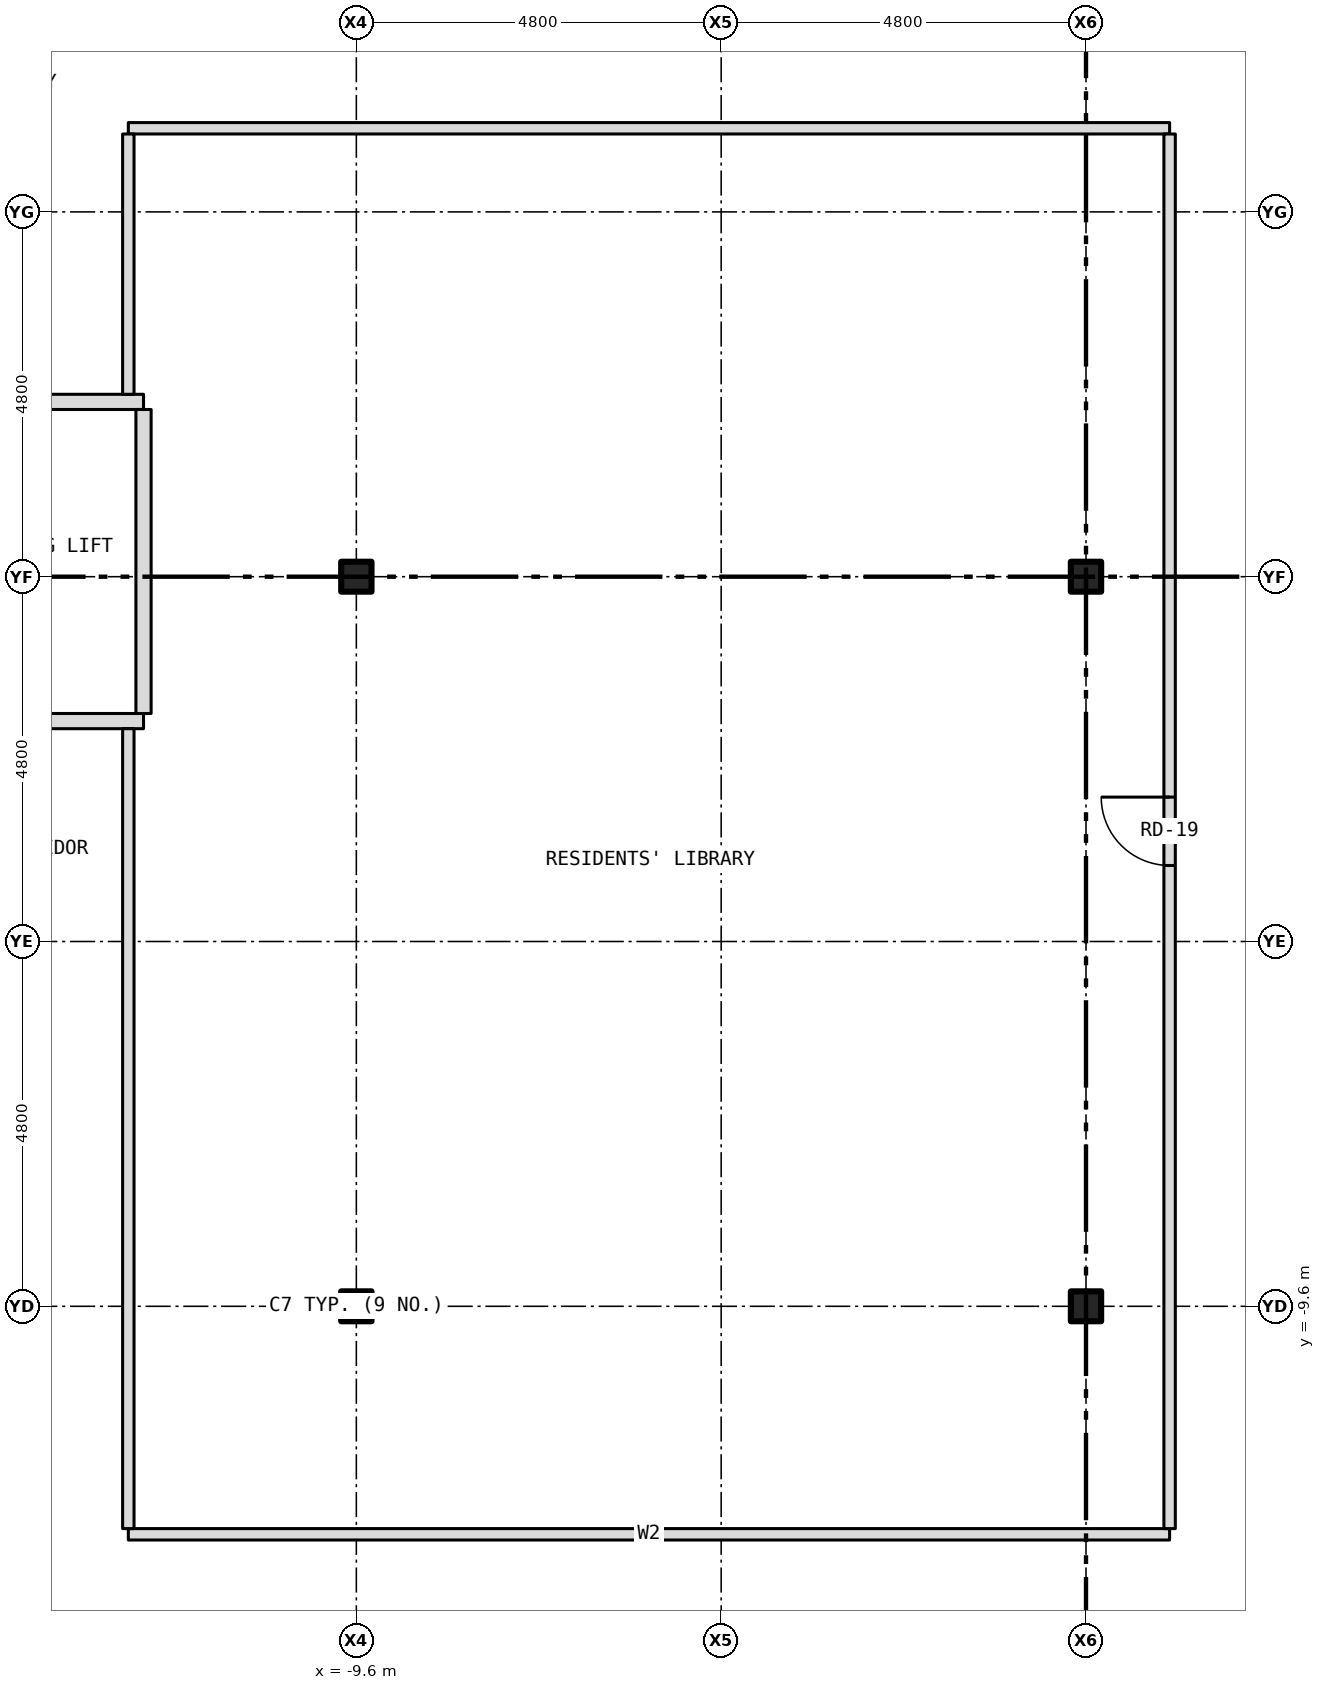
"""IFC4 building model, lengths in metres.
Left out: names, types, materials, properties, quantities, classifications, styles, units other than length and angle.
Written with IfcOpenShell. Run it as: python <this file> out.ifc"""

import sys

from ifc_helpers import new_model, si_unit, direction, frame, frame_2d, origin, origin_2d, place, context, subcontext, project, spatial, rectangle, i_section, extrude, element, fill, save


model = new_model("IFC4")
c1 = context("Model", 3, precision=1e-05, world=origin(), true_north=direction((0.0, 1.0)))
c2 = subcontext(c1, "Body", "Model", "MODEL_VIEW")
j1 = project(units=[si_unit("LENGTHUNIT", "METRE"), si_unit("PLANEANGLEUNIT", "RADIAN")], contexts=[c1])
p1 = place(None, origin())
s1 = spatial("IfcSite", under=j1, at=p1, CompositionType="ELEMENT")
p2 = place(p1, origin())
s2 = spatial("IfcBuilding", under=s1, at=p2, CompositionType="ELEMENT")
p3 = place(p2, frame((0.0, 0.0, 92.5)))
s3 = spatial("IfcBuildingStorey", under=s2, at=p3, CompositionType="ELEMENT", Elevation=92.5)
for number, where, z_axis, x_axis in (
    (1, (-9.6, -9.6, -0.15), (0.0, 0.0, 1.0), (1.0, 0.0, 0.0)),
    (2, (-9.6, 0.0, -0.15), (0.0, 0.0, 1.0), (1.0, 0.0, 0.0)),
    (3, (0.0, -9.6, -0.15), (0.0, 0.0, 1.0), (1.0, 0.0, 0.0)),
    (4, (0.0, 0.0, -0.15), (0.0, 0.0, 1.0), (1.0, 0.0, 0.0)),
):
    element("IfcColumn", number, at=place(p3, frame(where, z_axis=z_axis, x_axis=x_axis)), inside=s3, PredefinedType="COLUMN", context=c2, shape_type="SweptSolid", body=[
        extrude(i_section(OverallWidth=0.399, OverallDepth=0.394, WebThickness=0.023, FlangeThickness=0.037, at=origin_2d()), origin(), (0.0, 0.0, 1.0), 3.5),
    ])
p4 = place(p3, frame((-12.6, -12.6, 0.0), z_axis=(0.0, 0.0, 1.0), x_axis=(1.0, 0.0, 0.0)))
e5 = element("IfcWall", 5, at=p4, inside=s3, PredefinedType="PARTITIONING", context=c2, shape_type="SweptSolid", body=[
    extrude(rectangle(XDim=13.7, YDim=0.15, at=frame_2d((6.85, 0.0))), origin(), (0.0, 0.0, 1.0), 3.35),
])
p5 = place(p3, frame((-15.68, -1.9, 0.0), z_axis=(0.0, 0.0, 1.0), x_axis=(1.0, 0.0, 0.0)))
e6 = element("IfcWall", 6, at=p5, inside=s3, PredefinedType="PARTITIONING", context=c2, shape_type="SweptSolid", body=[
    extrude(rectangle(XDim=3.28, YDim=0.2, at=frame_2d((1.64, 0.0))), origin(), (0.0, 0.0, 1.0), 3.35),
])
p6 = place(p5, frame((0.94, 0.0, 0.0)))
e7 = element("IfcOpeningElement", 7, at=p6, cuts=e6, PredefinedType="OPENING", context=c2, shape_type="SweptSolid", body=[
    extrude(rectangle(XDim=1.1, YDim=2.1, at=frame_2d((0.55, 1.05))), frame((0.0, 0.112, 0.0), z_axis=(0.0, -1.0, 0.0), x_axis=(1.0, 0.0, 0.0)), (0.0, 0.0, 1.0), 0.224),
])
p7 = place(p3, frame((-15.68, 2.3, 0.0), z_axis=(0.0, 0.0, 1.0), x_axis=(1.0, 0.0, 0.0)))
e8 = element("IfcWall", 8, at=p7, inside=s3, PredefinedType="PARTITIONING", context=c2, shape_type="SweptSolid", body=[
    extrude(rectangle(XDim=3.28, YDim=0.2, at=frame_2d((1.64, 0.0))), origin(), (0.0, 0.0, 1.0), 3.35),
])
p8 = place(p7, frame((0.84, 0.0, 0.0)))
e9 = element("IfcOpeningElement", 9, at=p8, cuts=e8, PredefinedType="OPENING", context=c2, shape_type="SweptSolid", body=[
    extrude(rectangle(XDim=1.1, YDim=2.1, at=frame_2d((0.55, 1.05))), frame((0.0, 0.112, 0.0), z_axis=(0.0, -1.0, 0.0), x_axis=(1.0, 0.0, 0.0)), (0.0, 0.0, 1.0), 0.224),
])
p9 = place(p3, frame((-12.6, 5.9, 0.0), z_axis=(0.0, 0.0, 1.0), x_axis=(1.0, 0.0, 0.0)))
e10 = element("IfcWall", 10, at=p9, inside=s3, PredefinedType="PARTITIONING", context=c2, shape_type="SweptSolid", body=[
    extrude(rectangle(XDim=13.7, YDim=0.15, at=frame_2d((6.85, 0.0))), origin(), (0.0, 0.0, 1.0), 3.35),
])
p10 = place(p3, frame((-12.6, -12.525, 0.0), z_axis=(0.0, 0.0, 1.0), x_axis=(0.0, 1.0, 0.0)))
e11 = element("IfcWall", 11, at=p10, inside=s3, PredefinedType="PARTITIONING", context=c2, shape_type="SweptSolid", body=[
    extrude(rectangle(XDim=10.525, YDim=0.15, at=frame_2d((5.262, 0.0))), origin(), (0.0, 0.0, 1.0), 3.35),
])
p11 = place(p3, frame((-12.6, 2.4, 0.0), z_axis=(0.0, 0.0, 1.0), x_axis=(0.0, 1.0, 0.0)))
e12 = element("IfcWall", 12, at=p11, inside=s3, PredefinedType="PARTITIONING", context=c2, shape_type="SweptSolid", body=[
    extrude(rectangle(XDim=3.425, YDim=0.15, at=frame_2d((1.712, 0.0))), origin(), (0.0, 0.0, 1.0), 3.35),
])
p12 = place(p3, frame((-12.4, -1.8, 0.0), z_axis=(0.0, 0.0, 1.0), x_axis=(0.0, 1.0, 0.0)))
e13 = element("IfcWall", 13, at=p12, inside=s3, PredefinedType="PARTITIONING", context=c2, shape_type="SweptSolid", body=[
    extrude(rectangle(XDim=4.0, YDim=0.2, at=frame_2d((2.0, 0.0))), origin(), (0.0, 0.0, 1.0), 3.35),
])
p13 = place(p3, frame((1.1, -12.525, 0.0), z_axis=(0.0, 0.0, 1.0), x_axis=(0.0, 1.0, 0.0)))
e14 = element("IfcWall", 14, at=p13, inside=s3, PredefinedType="PARTITIONING", context=c2, shape_type="SweptSolid", body=[
    extrude(rectangle(XDim=18.35, YDim=0.15, at=frame_2d((9.175, 0.0))), origin(), (0.0, 0.0, 1.0), 3.35),
])
p14 = place(p13, frame((8.725, 0.0, 0.0)))
e15 = element("IfcOpeningElement", 15, at=p14, cuts=e14, PredefinedType="OPENING", context=c2, shape_type="SweptSolid", body=[
    extrude(rectangle(XDim=0.9, YDim=2.1, at=frame_2d((0.45, 1.05))), frame((0.0, 0.087, 0.0), z_axis=(0.0, -1.0, 0.0), x_axis=(1.0, 0.0, 0.0)), (0.0, 0.0, 1.0), 0.174),
])
p15 = place(p14, origin())
e16 = element("IfcDoor", 16, at=p15, inside=s3, OperationType="SINGLE_SWING_RIGHT", PredefinedType="DOOR", context=c2, shape_type="SweptSolid", body=[
    extrude(rectangle(XDim=0.9, YDim=2.1, at=frame_2d((0.45, 1.05))), frame((0.0, 0.025, 0.0), z_axis=(0.0, -1.0, 0.0), x_axis=(1.0, 0.0, 0.0)), (0.0, 0.0, 1.0), 0.05),
])
fill(e15, e16)
save(model, sys.argv[1])
